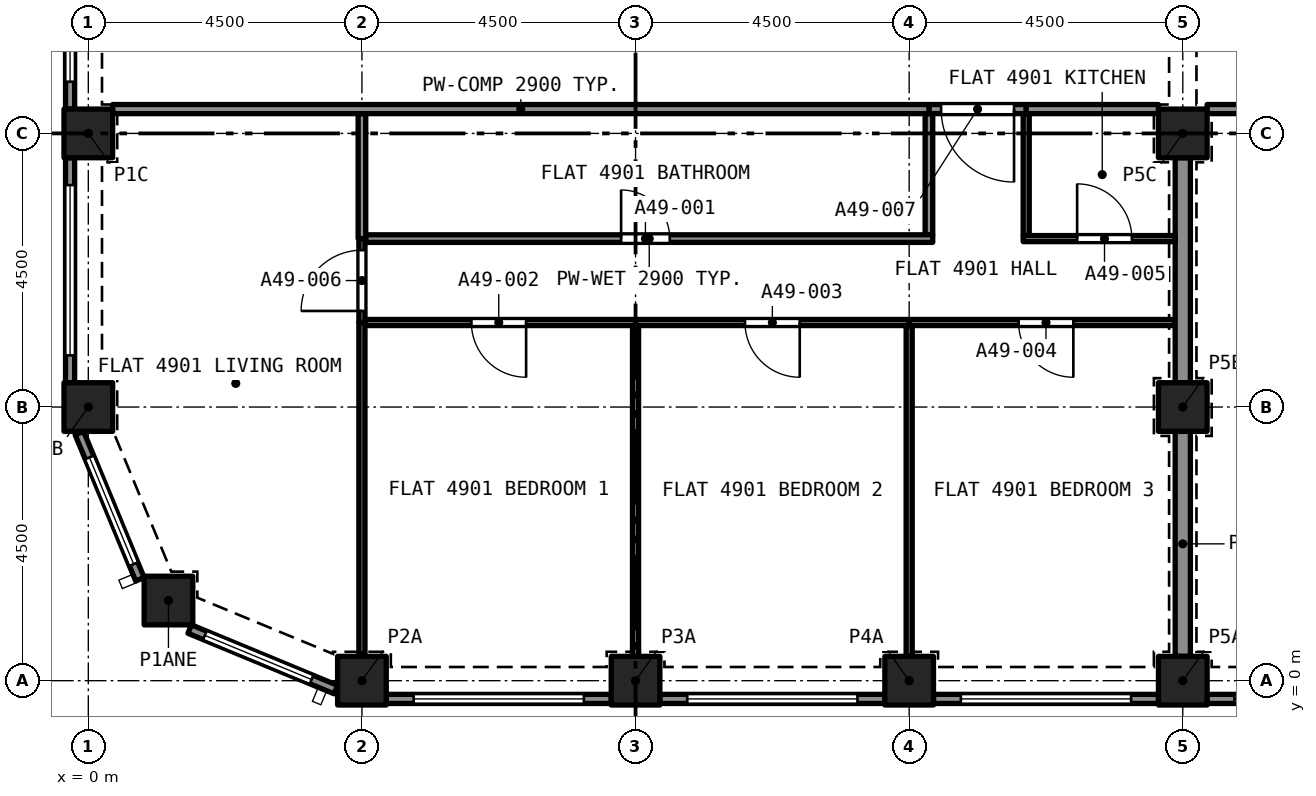
"""IFC4 building model, lengths in metres.
Left out: names, types, materials, properties, quantities, classifications, styles, units other than length and angle.
Written with IfcOpenShell. Run it as: python <this file> out.ifc"""

import sys

from ifc_helpers import new_model, si_unit, direction, frame, frame_2d, origin, origin_2d, place, context, subcontext, project, spatial, rectangle, extrude, element, fill, save


model = new_model("IFC4")
c1 = context("Model", 3, precision=1e-05, world=origin(), true_north=direction((0.0, 1.0)))
c2 = subcontext(c1, "Body", "Model", "MODEL_VIEW")
j1 = project(units=[si_unit("LENGTHUNIT", "METRE"), si_unit("PLANEANGLEUNIT", "RADIAN")], contexts=[c1])
p1 = place(None, origin())
s1 = spatial("IfcSite", under=j1, at=p1, CompositionType="ELEMENT")
p2 = place(p1, origin())
s2 = spatial("IfcBuilding", under=s1, at=p2, CompositionType="ELEMENT")
p3 = place(p2, frame((0.0, 0.0, 179.5)))
s3 = spatial("IfcBuildingStorey", under=s2, at=p3, CompositionType="ELEMENT", Elevation=179.5)
for number, where, z_axis, x_axis in (
    (1, (4.5, 0.0, 0.0), (0.0, 0.0, 1.0), (1.0, 0.0, 0.0)),
    (2, (9.0, 0.0, 0.0), (0.0, 0.0, 1.0), (1.0, 0.0, 0.0)),
    (3, (13.5, 0.0, 0.0), (0.0, 0.0, 1.0), (1.0, 0.0, 0.0)),
    (4, (18.0, 0.0, 0.0), (0.0, 0.0, 1.0), (1.0, 0.0, 0.0)),
    (5, (1.318, 1.318, 0.0), (0.0, 0.0, 1.0), (1.0, 0.0, 0.0)),
    (6, (0.0, 4.5, 0.0), (0.0, 0.0, 1.0), (1.0, 0.0, 0.0)),
    (7, (18.0, 4.5, 0.0), (0.0, 0.0, 1.0), (1.0, 0.0, 0.0)),
    (8, (0.0, 9.0, 0.0), (0.0, 0.0, 1.0), (1.0, 0.0, 0.0)),
    (9, (18.0, 9.0, 0.0), (0.0, 0.0, 1.0), (1.0, 0.0, 0.0)),
):
    element("IfcColumn", number, at=place(p3, frame(where, z_axis=z_axis, x_axis=x_axis)), inside=s3, PredefinedType="COLUMN", context=c2, shape_type="SweptSolid", body=[
        extrude(rectangle(XDim=0.8, YDim=0.8, at=origin_2d()), origin(), (0.0, 0.0, 1.0), 3.2),
    ])
p4 = place(p3, frame((-0.3, 9.4, 0.0), z_axis=(0.0, 0.0, 1.0), x_axis=(0.0, 1.0, 0.0)))
e10 = element("IfcWall", 10, at=p4, inside=s3, PredefinedType="SOLIDWALL", context=c2, shape_type="SweptSolid", body=[
    extrude(rectangle(XDim=3.7, YDim=0.15, at=frame_2d((1.85, 0.0))), origin(), (0.0, 0.0, 1.0), 3.2),
])
p5 = place(p4, frame((0.45, 0.0, 0.45)))
e11 = element("IfcOpeningElement", 11, at=p5, cuts=e10, PredefinedType="OPENING", context=c2, shape_type="SweptSolid", body=[
    extrude(rectangle(XDim=2.8, YDim=1.95, at=frame_2d((1.4, 0.975))), frame((0.0, 0.085, 0.0), z_axis=(0.0, -1.0, 0.0), x_axis=(1.0, 0.0, 0.0)), (0.0, 0.0, 1.0), 0.17),
])
p6 = place(p3, frame((-0.3, 4.9, 0.0), z_axis=(0.0, 0.0, 1.0), x_axis=(0.0, 1.0, 0.0)))
e12 = element("IfcWall", 12, at=p6, inside=s3, PredefinedType="SOLIDWALL", context=c2, shape_type="SweptSolid", body=[
    extrude(rectangle(XDim=3.7, YDim=0.15, at=frame_2d((1.85, 0.0))), origin(), (0.0, 0.0, 1.0), 3.2),
])
p7 = place(p6, frame((0.45, 0.0, 0.45)))
e13 = element("IfcOpeningElement", 13, at=p7, cuts=e12, PredefinedType="OPENING", context=c2, shape_type="SweptSolid", body=[
    extrude(rectangle(XDim=2.8, YDim=1.95, at=frame_2d((1.4, 0.975))), frame((0.0, 0.085, 0.0), z_axis=(0.0, -1.0, 0.0), x_axis=(1.0, 0.0, 0.0)), (0.0, 0.0, 1.0), 0.17),
])
p8 = place(p3, frame((0.849, 1.667, 0.0), z_axis=(0.0, 0.0, 1.0), x_axis=(-0.382669406082, 0.923885342263, 0.0)))
e14 = element("IfcWall", 14, at=p8, inside=s3, PredefinedType="SOLIDWALL", context=c2, shape_type="SweptSolid", body=[
    extrude(rectangle(XDim=2.602, YDim=0.15, at=frame_2d((1.301, 0.0))), origin(), (0.0, 0.0, 1.0), 3.2),
])
p9 = place(p8, frame((0.27, 0.0, 0.45)))
e15 = element("IfcOpeningElement", 15, at=p9, cuts=e14, PredefinedType="OPENING", context=c2, shape_type="SweptSolid", body=[
    extrude(rectangle(XDim=1.9, YDim=1.95, at=frame_2d((0.95, 0.975))), frame((0.0, 0.085, 0.0), z_axis=(0.0, -1.0, 0.0), x_axis=(1.0, 0.0, 0.0)), (0.0, 0.0, 1.0), 0.17),
])
p10 = place(p3, frame((4.071, -0.147, 0.0), z_axis=(0.0, 0.0, 1.0), x_axis=(-0.923885342263, 0.382669406082, 0.0)))
e16 = element("IfcWall", 16, at=p10, inside=s3, PredefinedType="SOLIDWALL", context=c2, shape_type="SweptSolid", body=[
    extrude(rectangle(XDim=2.602, YDim=0.15, at=frame_2d((1.301, 0.0))), origin(), (0.0, 0.0, 1.0), 3.2),
])
p11 = place(p10, frame((0.432, 0.0, 0.45)))
e17 = element("IfcOpeningElement", 17, at=p11, cuts=e16, PredefinedType="OPENING", context=c2, shape_type="SweptSolid", body=[
    extrude(rectangle(XDim=1.9, YDim=1.95, at=frame_2d((0.95, 0.975))), frame((0.0, 0.085, 0.0), z_axis=(0.0, -1.0, 0.0), x_axis=(1.0, 0.0, 0.0)), (0.0, 0.0, 1.0), 0.17),
])
p12 = place(p3, frame((8.6, -0.3, 0.0), z_axis=(0.0, 0.0, 1.0), x_axis=(-1.0, 0.0, 0.0)))
e18 = element("IfcWall", 18, at=p12, inside=s3, PredefinedType="SOLIDWALL", context=c2, shape_type="SweptSolid", body=[
    extrude(rectangle(XDim=3.7, YDim=0.15, at=frame_2d((1.85, 0.0))), origin(), (0.0, 0.0, 1.0), 3.2),
])
p13 = place(p12, frame((0.45, 0.0, 0.45)))
e19 = element("IfcOpeningElement", 19, at=p13, cuts=e18, PredefinedType="OPENING", context=c2, shape_type="SweptSolid", body=[
    extrude(rectangle(XDim=2.8, YDim=1.95, at=frame_2d((1.4, 0.975))), frame((0.0, 0.085, 0.0), z_axis=(0.0, -1.0, 0.0), x_axis=(1.0, 0.0, 0.0)), (0.0, 0.0, 1.0), 0.17),
])
p14 = place(p3, frame((13.1, -0.3, 0.0), z_axis=(0.0, 0.0, 1.0), x_axis=(-1.0, 0.0, 0.0)))
e20 = element("IfcWall", 20, at=p14, inside=s3, PredefinedType="SOLIDWALL", context=c2, shape_type="SweptSolid", body=[
    extrude(rectangle(XDim=3.7, YDim=0.15, at=frame_2d((1.85, 0.0))), origin(), (0.0, 0.0, 1.0), 3.2),
])
p15 = place(p14, frame((0.45, 0.0, 0.45)))
e21 = element("IfcOpeningElement", 21, at=p15, cuts=e20, PredefinedType="OPENING", context=c2, shape_type="SweptSolid", body=[
    extrude(rectangle(XDim=2.8, YDim=1.95, at=frame_2d((1.4, 0.975))), frame((0.0, 0.085, 0.0), z_axis=(0.0, -1.0, 0.0), x_axis=(1.0, 0.0, 0.0)), (0.0, 0.0, 1.0), 0.17),
])
p16 = place(p3, frame((17.6, -0.3, 0.0), z_axis=(0.0, 0.0, 1.0), x_axis=(-1.0, 0.0, 0.0)))
e22 = element("IfcWall", 22, at=p16, inside=s3, PredefinedType="SOLIDWALL", context=c2, shape_type="SweptSolid", body=[
    extrude(rectangle(XDim=3.7, YDim=0.15, at=frame_2d((1.85, 0.0))), origin(), (0.0, 0.0, 1.0), 3.2),
])
p17 = place(p16, frame((0.45, 0.0, 0.45)))
e23 = element("IfcOpeningElement", 23, at=p17, cuts=e22, PredefinedType="OPENING", context=c2, shape_type="SweptSolid", body=[
    extrude(rectangle(XDim=2.8, YDim=1.95, at=frame_2d((1.4, 0.975))), frame((0.0, 0.085, 0.0), z_axis=(0.0, -1.0, 0.0), x_axis=(1.0, 0.0, 0.0)), (0.0, 0.0, 1.0), 0.17),
])
p18 = place(p3, frame((22.1, -0.3, 0.0), z_axis=(0.0, 0.0, 1.0), x_axis=(-1.0, 0.0, 0.0)))
e24 = element("IfcWall", 24, at=p18, inside=s3, PredefinedType="SOLIDWALL", context=c2, shape_type="SweptSolid", body=[
    extrude(rectangle(XDim=3.7, YDim=0.15, at=frame_2d((1.85, 0.0))), origin(), (0.0, 0.0, 1.0), 3.2),
])
p19 = place(p18, frame((0.45, 0.0, 0.45)))
e25 = element("IfcOpeningElement", 25, at=p19, cuts=e24, PredefinedType="OPENING", context=c2, shape_type="SweptSolid", body=[
    extrude(rectangle(XDim=2.8, YDim=1.95, at=frame_2d((1.4, 0.975))), frame((0.0, 0.085, 0.0), z_axis=(0.0, -1.0, 0.0), x_axis=(1.0, 0.0, 0.0)), (0.0, 0.0, 1.0), 0.17),
])
p20 = place(p3, frame((13.825, 7.333, 0.0), z_axis=(0.0, 0.0, 1.0), x_axis=(0.0, 1.0, 0.0)))
e26 = element("IfcWall", 26, at=p20, inside=s3, PredefinedType="PARTITIONING", context=c2, shape_type="SweptSolid", body=[
    extrude(rectangle(XDim=1.992, YDim=0.125, at=frame_2d((0.996, 0.0))), origin(), (0.0, 0.0, 1.0), 2.9),
])
p21 = place(p3, frame((4.562, 7.27, 0.0), z_axis=(0.0, 0.0, 1.0), x_axis=(1.0, 0.0, 0.0)))
e27 = element("IfcWall", 27, at=p21, inside=s3, PredefinedType="PARTITIONING", context=c2, shape_type="SweptSolid", body=[
    extrude(rectangle(XDim=9.325, YDim=0.125, at=frame_2d((4.663, 0.0))), origin(), (0.0, 0.0, 1.0), 2.9),
])
p22 = place(p21, frame((4.2, 0.0, 0.0)))
e28 = element("IfcOpeningElement", 28, at=p22, cuts=e27, PredefinedType="OPENING", context=c2, shape_type="SweptSolid", body=[
    extrude(rectangle(XDim=0.8, YDim=2.1, at=frame_2d((0.4, 1.05))), frame((0.0, 0.073, 0.0), z_axis=(0.0, -1.0, 0.0), x_axis=(1.0, 0.0, 0.0)), (0.0, 0.0, 1.0), 0.145),
])
p23 = place(p3, frame((4.5, 7.27, 0.0), z_axis=(0.0, 0.0, 1.0), x_axis=(0.0, 1.0, 0.0)))
e29 = element("IfcWall", 29, at=p23, inside=s3, PredefinedType="PARTITIONING", context=c2, shape_type="SweptSolid", body=[
    extrude(rectangle(XDim=2.055, YDim=0.125, at=frame_2d((1.027, 0.0))), origin(), (0.0, 0.0, 1.0), 2.9),
])
p24 = place(p3, frame((9.0, 0.4, 0.0), z_axis=(0.0, 0.0, 1.0), x_axis=(0.0, 1.0, 0.0)))
e30 = element("IfcWall", 30, at=p24, inside=s3, PredefinedType="PARTITIONING", context=c2, shape_type="SweptSolid", body=[
    extrude(rectangle(XDim=5.44, YDim=0.1, at=frame_2d((2.72, 0.0))), origin(), (0.0, 0.0, 1.0), 2.9),
])
p25 = place(p3, frame((9.0, 5.89, 0.0), z_axis=(0.0, 0.0, 1.0), x_axis=(-1.0, 0.0, 0.0)))
e31 = element("IfcWall", 31, at=p25, inside=s3, PredefinedType="PARTITIONING", context=c2, shape_type="SweptSolid", body=[
    extrude(rectangle(XDim=4.45, YDim=0.1, at=frame_2d((2.225, 0.0))), origin(), (0.0, 0.0, 1.0), 2.9),
])
p26 = place(p25, frame((1.8, 0.0, 0.0)))
e32 = element("IfcOpeningElement", 32, at=p26, cuts=e31, PredefinedType="OPENING", context=c2, shape_type="SweptSolid", body=[
    extrude(rectangle(XDim=0.9, YDim=2.1, at=frame_2d((0.45, 1.05))), frame((0.0, 0.06, 0.0), z_axis=(0.0, -1.0, 0.0), x_axis=(1.0, 0.0, 0.0)), (0.0, 0.0, 1.0), 0.12),
])
p27 = place(p3, frame((4.5, 0.433, 0.0), z_axis=(0.0, 0.0, 1.0), x_axis=(0.0, 1.0, 0.0)))
e33 = element("IfcWall", 33, at=p27, inside=s3, PredefinedType="PARTITIONING", context=c2, shape_type="SweptSolid", body=[
    extrude(rectangle(XDim=5.457, YDim=0.1, at=frame_2d((2.729, 0.0))), origin(), (0.0, 0.0, 1.0), 2.9),
])
p28 = place(p3, frame((13.5, 0.4, 0.0), z_axis=(0.0, 0.0, 1.0), x_axis=(0.0, 1.0, 0.0)))
e34 = element("IfcWall", 34, at=p28, inside=s3, PredefinedType="PARTITIONING", context=c2, shape_type="SweptSolid", body=[
    extrude(rectangle(XDim=5.44, YDim=0.1, at=frame_2d((2.72, 0.0))), origin(), (0.0, 0.0, 1.0), 2.9),
])
p29 = place(p3, frame((13.5, 5.89, 0.0), z_axis=(0.0, 0.0, 1.0), x_axis=(-1.0, 0.0, 0.0)))
e35 = element("IfcWall", 35, at=p29, inside=s3, PredefinedType="PARTITIONING", context=c2, shape_type="SweptSolid", body=[
    extrude(rectangle(XDim=4.5, YDim=0.1, at=frame_2d((2.25, 0.0))), origin(), (0.0, 0.0, 1.0), 2.9),
])
p30 = place(p29, frame((1.8, 0.0, 0.0)))
e36 = element("IfcOpeningElement", 36, at=p30, cuts=e35, PredefinedType="OPENING", context=c2, shape_type="SweptSolid", body=[
    extrude(rectangle(XDim=0.9, YDim=2.1, at=frame_2d((0.45, 1.05))), frame((0.0, 0.06, 0.0), z_axis=(0.0, -1.0, 0.0), x_axis=(1.0, 0.0, 0.0)), (0.0, 0.0, 1.0), 0.12),
])
p31 = place(p3, frame((17.875, 5.89, 0.0), z_axis=(0.0, 0.0, 1.0), x_axis=(-1.0, 0.0, 0.0)))
e37 = element("IfcWall", 37, at=p31, inside=s3, PredefinedType="PARTITIONING", context=c2, shape_type="SweptSolid", body=[
    extrude(rectangle(XDim=4.375, YDim=0.1, at=frame_2d((2.188, 0.0))), origin(), (0.0, 0.0, 1.0), 2.9),
])
p32 = place(p31, frame((1.675, 0.0, 0.0)))
e38 = element("IfcOpeningElement", 38, at=p32, cuts=e37, PredefinedType="OPENING", context=c2, shape_type="SweptSolid", body=[
    extrude(rectangle(XDim=0.9, YDim=2.1, at=frame_2d((0.45, 1.05))), frame((0.0, 0.06, 0.0), z_axis=(0.0, -1.0, 0.0), x_axis=(1.0, 0.0, 0.0)), (0.0, 0.0, 1.0), 0.12),
])
for number, where, z_axis, x_axis in (
    (39, (18.0, 4.9, 0.0), (0.0, 0.0, 1.0), (0.0, 1.0, 0.0)),
    (40, (18.0, 0.4, 0.0), (0.0, 0.0, 1.0), (0.0, 1.0, 0.0)),
):
    element("IfcWall", number, at=place(p3, frame(where, z_axis=z_axis, x_axis=x_axis)), inside=s3, PredefinedType="PARTITIONING", context=c2, shape_type="SweptSolid", body=[
        extrude(rectangle(XDim=3.7, YDim=0.25, at=frame_2d((1.85, 0.0))), origin(), (0.0, 0.0, 1.0), 2.38),
    ])
p33 = place(p3, frame((15.425, 7.32, 0.0), z_axis=(0.0, 0.0, 1.0), x_axis=(0.0, 1.0, 0.0)))
e41 = element("IfcWall", 41, at=p33, inside=s3, PredefinedType="PARTITIONING", context=c2, shape_type="SweptSolid", body=[
    extrude(rectangle(XDim=2.005, YDim=0.1, at=frame_2d((1.002, 0.0))), origin(), (0.0, 0.0, 1.0), 2.9),
])
p34 = place(p3, frame((15.375, 7.27, 0.0), z_axis=(0.0, 0.0, 1.0), x_axis=(1.0, 0.0, 0.0)))
e42 = element("IfcWall", 42, at=p34, inside=s3, PredefinedType="PARTITIONING", context=c2, shape_type="SweptSolid", body=[
    extrude(rectangle(XDim=2.5, YDim=0.1, at=frame_2d((1.25, 0.0))), origin(), (0.0, 0.0, 1.0), 2.9),
])
p35 = place(p34, frame((0.887, 0.0, 0.0)))
e43 = element("IfcOpeningElement", 43, at=p35, cuts=e42, PredefinedType="OPENING", context=c2, shape_type="SweptSolid", body=[
    extrude(rectangle(XDim=0.9, YDim=2.1, at=frame_2d((0.45, 1.05))), frame((0.0, 0.06, 0.0), z_axis=(0.0, -1.0, 0.0), x_axis=(1.0, 0.0, 0.0)), (0.0, 0.0, 1.0), 0.12),
])
p36 = place(p3, frame((4.5, 5.89, 0.0), z_axis=(0.0, 0.0, 1.0), x_axis=(0.0, 1.0, 0.0)))
e44 = element("IfcWall", 44, at=p36, inside=s3, PredefinedType="PARTITIONING", context=c2, shape_type="SweptSolid", body=[
    extrude(rectangle(XDim=1.38, YDim=0.1, at=frame_2d((0.69, 0.0))), origin(), (0.0, 0.0, 1.0), 2.9),
])
p37 = place(p36, frame((0.19, 0.0, 0.0)))
e45 = element("IfcOpeningElement", 45, at=p37, cuts=e44, PredefinedType="OPENING", context=c2, shape_type="SweptSolid", body=[
    extrude(rectangle(XDim=1.0, YDim=2.1, at=frame_2d((0.5, 1.05))), frame((0.0, 0.06, 0.0), z_axis=(0.0, -1.0, 0.0), x_axis=(1.0, 0.0, 0.0)), (0.0, 0.0, 1.0), 0.12),
])
p38 = place(p3, frame((15.425, 9.4, 0.0), z_axis=(0.0, 0.0, 1.0), x_axis=(-1.0, 0.0, 0.0)))
e46 = element("IfcWall", 46, at=p38, inside=s3, PredefinedType="PARTITIONING", context=c2, shape_type="SweptSolid", body=[
    extrude(rectangle(XDim=1.6, YDim=0.15, at=frame_2d((0.8, 0.0))), origin(), (0.0, 0.0, 1.0), 2.9),
])
p39 = place(p38, frame((0.2, 0.0, 0.0)))
e47 = element("IfcOpeningElement", 47, at=p39, cuts=e46, PredefinedType="OPENING", context=c2, shape_type="SweptSolid", body=[
    extrude(rectangle(XDim=1.2, YDim=2.4, at=frame_2d((0.6, 1.2))), frame((0.0, 0.085, 0.0), z_axis=(0.0, -1.0, 0.0), x_axis=(1.0, 0.0, 0.0)), (0.0, 0.0, 1.0), 0.17),
])
p40 = place(p3, frame((15.425, 9.4, 0.0), z_axis=(0.0, 0.0, 1.0), x_axis=(1.0, 0.0, 0.0)))
e48 = element("IfcWall", 48, at=p40, inside=s3, PredefinedType="PARTITIONING", context=c2, shape_type="SweptSolid", body=[
    extrude(rectangle(XDim=2.175, YDim=0.15, at=frame_2d((1.087, 0.0))), origin(), (0.0, 0.0, 1.0), 2.9),
])
p41 = place(p3, frame((0.4, 9.4, 0.0), z_axis=(0.0, 0.0, 1.0), x_axis=(1.0, 0.0, 0.0)))
e49 = element("IfcWall", 49, at=p41, inside=s3, PredefinedType="PARTITIONING", context=c2, shape_type="SweptSolid", body=[
    extrude(rectangle(XDim=13.425, YDim=0.15, at=frame_2d((6.712, 0.0))), origin(), (0.0, 0.0, 1.0), 2.9),
])
p42 = place(p3, frame((31.1, 9.4, 0.0), z_axis=(0.0, 0.0, 1.0), x_axis=(-1.0, 0.0, 0.0)))
e50 = element("IfcWall", 50, at=p42, inside=s3, PredefinedType="PARTITIONING", context=c2, shape_type="SweptSolid", body=[
    extrude(rectangle(XDim=12.7, YDim=0.15, at=frame_2d((6.35, 0.0))), origin(), (0.0, 0.0, 1.0), 2.75),
])
p43 = place(p42, frame((6.05, 0.0, 0.0)))
e51 = element("IfcOpeningElement", 51, at=p43, cuts=e50, PredefinedType="OPENING", context=c2, shape_type="SweptSolid", body=[
    extrude(rectangle(XDim=1.0, YDim=2.1, at=frame_2d((0.5, 1.05))), frame((0.0, 0.085, 0.0), z_axis=(0.0, -1.0, 0.0), x_axis=(1.0, 0.0, 0.0)), (0.0, 0.0, 1.0), 0.17),
])
p44 = place(p5, origin())
e52 = element("IfcWindow", 52, at=p44, inside=s3, PartitioningType="SINGLE_PANEL", PredefinedType="WINDOW", context=c2, shape_type="SweptSolid", body=[
    extrude(rectangle(XDim=2.8, YDim=1.95, at=frame_2d((1.4, 0.975))), frame((0.0, 0.03, 0.0), z_axis=(0.0, -1.0, 0.0), x_axis=(1.0, 0.0, 0.0)), (0.0, 0.0, 1.0), 0.06),
])
fill(e11, e52)
p45 = place(p7, origin())
e53 = element("IfcWindow", 53, at=p45, inside=s3, PartitioningType="SINGLE_PANEL", PredefinedType="WINDOW", context=c2, shape_type="SweptSolid", body=[
    extrude(rectangle(XDim=2.8, YDim=1.95, at=frame_2d((1.4, 0.975))), frame((0.0, 0.03, 0.0), z_axis=(0.0, -1.0, 0.0), x_axis=(1.0, 0.0, 0.0)), (0.0, 0.0, 1.0), 0.06),
])
fill(e13, e53)
p46 = place(p9, origin())
e54 = element("IfcWindow", 54, at=p46, inside=s3, PartitioningType="SINGLE_PANEL", PredefinedType="WINDOW", context=c2, shape_type="SweptSolid", body=[
    extrude(rectangle(XDim=1.9, YDim=1.95, at=frame_2d((0.95, 0.975))), frame((0.0, 0.03, 0.0), z_axis=(0.0, -1.0, 0.0), x_axis=(1.0, 0.0, 0.0)), (0.0, 0.0, 1.0), 0.06),
])
fill(e15, e54)
p47 = place(p11, origin())
e55 = element("IfcWindow", 55, at=p47, inside=s3, PartitioningType="SINGLE_PANEL", PredefinedType="WINDOW", context=c2, shape_type="SweptSolid", body=[
    extrude(rectangle(XDim=1.9, YDim=1.95, at=frame_2d((0.95, 0.975))), frame((0.0, 0.03, 0.0), z_axis=(0.0, -1.0, 0.0), x_axis=(1.0, 0.0, 0.0)), (0.0, 0.0, 1.0), 0.06),
])
fill(e17, e55)
p48 = place(p13, origin())
e56 = element("IfcWindow", 56, at=p48, inside=s3, PartitioningType="SINGLE_PANEL", PredefinedType="WINDOW", context=c2, shape_type="SweptSolid", body=[
    extrude(rectangle(XDim=2.8, YDim=1.95, at=frame_2d((1.4, 0.975))), frame((0.0, 0.03, 0.0), z_axis=(0.0, -1.0, 0.0), x_axis=(1.0, 0.0, 0.0)), (0.0, 0.0, 1.0), 0.06),
])
fill(e19, e56)
p49 = place(p15, origin())
e57 = element("IfcWindow", 57, at=p49, inside=s3, PartitioningType="SINGLE_PANEL", PredefinedType="WINDOW", context=c2, shape_type="SweptSolid", body=[
    extrude(rectangle(XDim=2.8, YDim=1.95, at=frame_2d((1.4, 0.975))), frame((0.0, 0.03, 0.0), z_axis=(0.0, -1.0, 0.0), x_axis=(1.0, 0.0, 0.0)), (0.0, 0.0, 1.0), 0.06),
])
fill(e21, e57)
p50 = place(p17, origin())
e58 = element("IfcWindow", 58, at=p50, inside=s3, PartitioningType="SINGLE_PANEL", PredefinedType="WINDOW", context=c2, shape_type="SweptSolid", body=[
    extrude(rectangle(XDim=2.8, YDim=1.95, at=frame_2d((1.4, 0.975))), frame((0.0, 0.03, 0.0), z_axis=(0.0, -1.0, 0.0), x_axis=(1.0, 0.0, 0.0)), (0.0, 0.0, 1.0), 0.06),
])
fill(e23, e58)
p51 = place(p19, origin())
e59 = element("IfcWindow", 59, at=p51, inside=s3, PartitioningType="SINGLE_PANEL", PredefinedType="WINDOW", context=c2, shape_type="SweptSolid", body=[
    extrude(rectangle(XDim=2.8, YDim=1.95, at=frame_2d((1.4, 0.975))), frame((0.0, 0.03, 0.0), z_axis=(0.0, -1.0, 0.0), x_axis=(1.0, 0.0, 0.0)), (0.0, 0.0, 1.0), 0.06),
])
fill(e25, e59)
p52 = place(p22, origin())
e60 = element("IfcDoor", 60, at=p52, inside=s3, OperationType="SINGLE_SWING_LEFT", PredefinedType="DOOR", context=c2, shape_type="SweptSolid", body=[
    extrude(rectangle(XDim=0.8, YDim=2.1, at=frame_2d((0.4, 1.05))), frame((0.0, 0.025, 0.0), z_axis=(0.0, -1.0, 0.0), x_axis=(1.0, 0.0, 0.0)), (0.0, 0.0, 1.0), 0.05),
])
fill(e28, e60)
p53 = place(p26, origin())
e61 = element("IfcDoor", 61, at=p53, inside=s3, OperationType="SINGLE_SWING_RIGHT", PredefinedType="DOOR", context=c2, shape_type="SweptSolid", body=[
    extrude(rectangle(XDim=0.9, YDim=2.1, at=frame_2d((0.45, 1.05))), frame((0.0, 0.025, 0.0), z_axis=(0.0, -1.0, 0.0), x_axis=(1.0, 0.0, 0.0)), (0.0, 0.0, 1.0), 0.05),
])
fill(e32, e61)
p54 = place(p30, origin())
e62 = element("IfcDoor", 62, at=p54, inside=s3, OperationType="SINGLE_SWING_LEFT", PredefinedType="DOOR", context=c2, shape_type="SweptSolid", body=[
    extrude(rectangle(XDim=0.9, YDim=2.1, at=frame_2d((0.45, 1.05))), frame((0.0, 0.025, 0.0), z_axis=(0.0, -1.0, 0.0), x_axis=(1.0, 0.0, 0.0)), (0.0, 0.0, 1.0), 0.05),
])
fill(e36, e62)
p55 = place(p32, origin())
e63 = element("IfcDoor", 63, at=p55, inside=s3, OperationType="SINGLE_SWING_LEFT", PredefinedType="DOOR", context=c2, shape_type="SweptSolid", body=[
    extrude(rectangle(XDim=0.9, YDim=2.1, at=frame_2d((0.45, 1.05))), frame((0.0, 0.025, 0.0), z_axis=(0.0, -1.0, 0.0), x_axis=(1.0, 0.0, 0.0)), (0.0, 0.0, 1.0), 0.05),
])
fill(e38, e63)
p56 = place(p35, origin())
e64 = element("IfcDoor", 64, at=p56, inside=s3, OperationType="SINGLE_SWING_RIGHT", PredefinedType="DOOR", context=c2, shape_type="SweptSolid", body=[
    extrude(rectangle(XDim=0.9, YDim=2.1, at=frame_2d((0.45, 1.05))), frame((0.0, 0.025, 0.0), z_axis=(0.0, -1.0, 0.0), x_axis=(1.0, 0.0, 0.0)), (0.0, 0.0, 1.0), 0.05),
])
fill(e43, e64)
p57 = place(p37, origin())
e65 = element("IfcDoor", 65, at=p57, inside=s3, OperationType="SINGLE_SWING_RIGHT", PredefinedType="DOOR", context=c2, shape_type="SweptSolid", body=[
    extrude(rectangle(XDim=1.0, YDim=2.1, at=frame_2d((0.5, 1.05))), frame((0.0, 0.025, 0.0), z_axis=(0.0, -1.0, 0.0), x_axis=(1.0, 0.0, 0.0)), (0.0, 0.0, 1.0), 0.05),
])
fill(e45, e65)
p58 = place(p39, origin())
e66 = element("IfcDoor", 66, at=p58, inside=s3, OperationType="SINGLE_SWING_LEFT", PredefinedType="DOOR", context=c2, shape_type="SweptSolid", body=[
    extrude(rectangle(XDim=1.2, YDim=2.4, at=frame_2d((0.6, 1.2))), frame((0.0, 0.025, 0.0), z_axis=(0.0, -1.0, 0.0), x_axis=(1.0, 0.0, 0.0)), (0.0, 0.0, 1.0), 0.05),
])
fill(e47, e66)
save(model, sys.argv[1])
